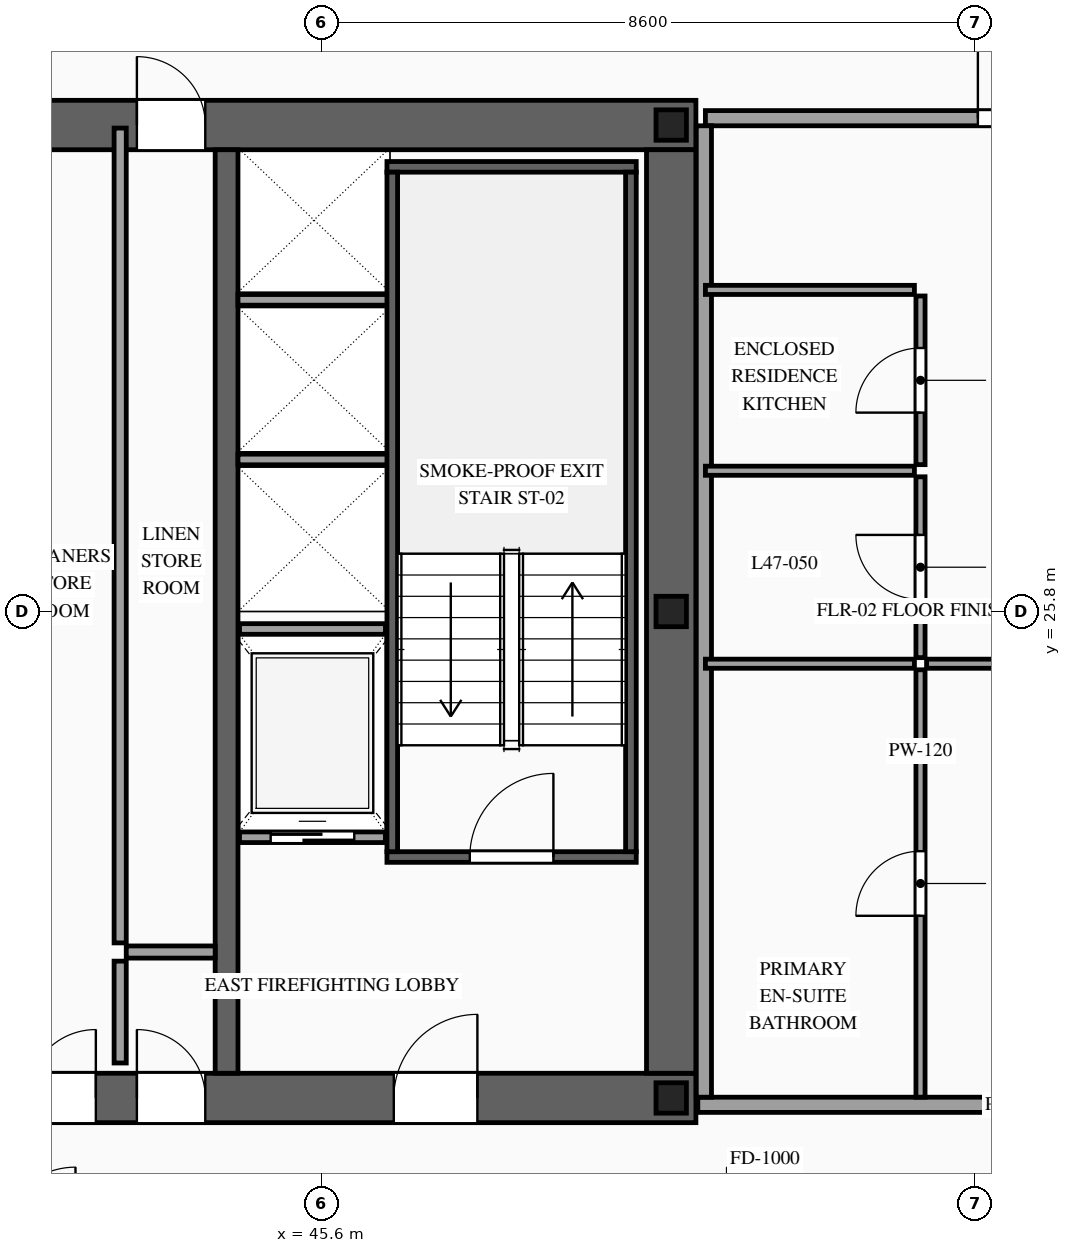
"""IFC4 building model, lengths in metres.
Left out: names, types, materials, properties, quantities, classifications, styles, units other than length and angle.
Written with IfcOpenShell. Run it as: python <this file> out.ifc"""

import sys

from ifc_helpers import new_model, si_unit, direction, frame, frame_2d, origin, origin_2d, place, context, subcontext, project, spatial, rectangle, i_section, extrude, source, transform, mapped, element, fill, save


model = new_model("IFC4")
c1 = context("Model", 3, precision=1e-05, world=origin(), true_north=direction((0.0, 1.0)))
c2 = subcontext(c1, "Body", "Model", "MODEL_VIEW")
j1 = project(units=[si_unit("LENGTHUNIT", "METRE"), si_unit("PLANEANGLEUNIT", "RADIAN")], contexts=[c1])
p1 = place(None, origin())
s1 = spatial("IfcSite", under=j1, at=p1, CompositionType="ELEMENT")
p2 = place(p1, origin())
s2 = spatial("IfcBuilding", under=s1, at=p2, CompositionType="ELEMENT")
p3 = place(p2, frame((0.0, 0.0, 181.0)))
s3 = spatial("IfcBuildingStorey", under=s2, at=p3, CompositionType="ELEMENT", Elevation=181.0)
p4 = place(p3, frame((23.475, 19.4, 0.0), z_axis=(0.0, 0.0, 1.0), x_axis=(1.0, 0.0, 0.0)))
e1 = element("IfcWall", 1, at=p4, inside=s3, PredefinedType="SHEAR", context=c2, shape_type="SweptSolid", body=[
    extrude(rectangle(XDim=27.05, YDim=0.65, at=frame_2d((13.525, 0.0))), origin(), (0.0, 0.0, 1.0), 3.5),
])
p5 = place(p4, frame((1.975, 0.0, 0.0)))
e2 = element("IfcOpeningElement", 2, at=p5, cuts=e1, PredefinedType="OPENING", context=c2, shape_type="SweptSolid", body=[
    extrude(rectangle(XDim=1.1, YDim=2.2, at=frame_2d((0.55, 1.1))), frame((0.0, 0.34, 0.0), z_axis=(0.0, -1.0, 0.0), x_axis=(1.0, 0.0, 0.0)), (0.0, 0.0, 1.0), 0.68),
])
p6 = place(p4, frame((9.875, 0.0, 0.0)))
e3 = element("IfcOpeningElement", 3, at=p6, cuts=e1, PredefinedType="OPENING", context=c2, shape_type="SweptSolid", body=[
    extrude(rectangle(XDim=1.1, YDim=2.2, at=frame_2d((0.55, 1.1))), frame((0.0, 0.34, 0.0), z_axis=(0.0, -1.0, 0.0), x_axis=(1.0, 0.0, 0.0)), (0.0, 0.0, 1.0), 0.68),
])
p7 = place(p4, frame((23.075, 0.0, 0.0)))
e4 = element("IfcOpeningElement", 4, at=p7, cuts=e1, PredefinedType="OPENING", context=c2, shape_type="SweptSolid", body=[
    extrude(rectangle(XDim=1.1, YDim=2.2, at=frame_2d((0.55, 1.1))), frame((0.0, 0.34, 0.0), z_axis=(0.0, -1.0, 0.0), x_axis=(1.0, 0.0, 0.0)), (0.0, 0.0, 1.0), 0.68),
])
p8 = place(p4, frame((19.695, 0.0, 0.0)))
e5 = element("IfcOpeningElement", 5, at=p8, cuts=e1, PredefinedType="OPENING", context=c2, shape_type="SweptSolid", body=[
    extrude(rectangle(XDim=0.9, YDim=2.15, at=frame_2d((0.45, 1.075))), frame((0.0, 0.34, 0.0), z_axis=(0.0, -1.0, 0.0), x_axis=(1.0, 0.0, 0.0)), (0.0, 0.0, 1.0), 0.68),
])
p9 = place(p4, frame((18.255, 0.0, 0.0)))
e6 = element("IfcOpeningElement", 6, at=p9, cuts=e1, PredefinedType="OPENING", context=c2, shape_type="SweptSolid", body=[
    extrude(rectangle(XDim=0.9, YDim=2.15, at=frame_2d((0.45, 1.075))), frame((0.0, 0.34, 0.0), z_axis=(0.0, -1.0, 0.0), x_axis=(1.0, 0.0, 0.0)), (0.0, 0.0, 1.0), 0.68),
])
p10 = place(p3, frame((23.475, 32.2, 0.0), z_axis=(0.0, 0.0, 1.0), x_axis=(1.0, 0.0, 0.0)))
e7 = element("IfcWall", 7, at=p10, inside=s3, PredefinedType="SHEAR", context=c2, shape_type="SweptSolid", body=[
    extrude(rectangle(XDim=27.05, YDim=0.65, at=frame_2d((13.525, 0.0))), origin(), (0.0, 0.0, 1.0), 3.5),
])
p11 = place(p10, frame((4.595, 0.0, 0.0)))
e8 = element("IfcOpeningElement", 8, at=p11, cuts=e7, PredefinedType="OPENING", context=c2, shape_type="SweptSolid", body=[
    extrude(rectangle(XDim=0.9, YDim=2.15, at=frame_2d((0.45, 1.075))), frame((0.0, 0.34, 0.0), z_axis=(0.0, -1.0, 0.0), x_axis=(1.0, 0.0, 0.0)), (0.0, 0.0, 1.0), 0.68),
])
p12 = place(p10, frame((9.875, 0.0, 0.0)))
e9 = element("IfcOpeningElement", 9, at=p12, cuts=e7, PredefinedType="OPENING", context=c2, shape_type="SweptSolid", body=[
    extrude(rectangle(XDim=1.1, YDim=2.2, at=frame_2d((0.55, 1.1))), frame((0.0, 0.34, 0.0), z_axis=(0.0, -1.0, 0.0), x_axis=(1.0, 0.0, 0.0)), (0.0, 0.0, 1.0), 0.68),
])
p13 = place(p10, frame((15.725, 0.0, 0.0)))
e10 = element("IfcOpeningElement", 10, at=p13, cuts=e7, PredefinedType="OPENING", context=c2, shape_type="SweptSolid", body=[
    extrude(rectangle(XDim=1.1, YDim=2.2, at=frame_2d((0.55, 1.1))), frame((0.0, 0.34, 0.0), z_axis=(0.0, -1.0, 0.0), x_axis=(1.0, 0.0, 0.0)), (0.0, 0.0, 1.0), 0.68),
])
p14 = place(p10, frame((19.695, 0.0, 0.0)))
e11 = element("IfcOpeningElement", 11, at=p14, cuts=e7, PredefinedType="OPENING", context=c2, shape_type="SweptSolid", body=[
    extrude(rectangle(XDim=0.9, YDim=2.15, at=frame_2d((0.45, 1.075))), frame((0.0, 0.34, 0.0), z_axis=(0.0, -1.0, 0.0), x_axis=(1.0, 0.0, 0.0)), (0.0, 0.0, 1.0), 0.68),
])
m1 = source(origin(), c2, "Body", "SweptSolid", [
    extrude(rectangle(XDim=12.15, YDim=0.65, at=frame_2d((6.075, 0.0))), origin(), (0.0, 0.0, 1.0), 3.5),
])
p15 = place(p3, frame((50.2, 19.725, 0.0), z_axis=(0.0, 0.0, 1.0), x_axis=(0.0, 1.0, 0.0)))
e12 = element("IfcWall", 12, at=p15, inside=s3, PredefinedType="SHEAR", context=c2, shape_type="MappedRepresentation", body=[
    mapped(m1, transform((0.0, 0.0, 0.0), scale=1.0)),
])
m2 = source(origin(), c2, "Body", "SweptSolid", [
    extrude(rectangle(XDim=12.15, YDim=0.3, at=frame_2d((6.075, 0.0))), origin(), (0.0, 0.0, 1.0), 3.5),
])
p16 = place(p3, frame((44.35, 19.725, 0.0), z_axis=(0.0, 0.0, 1.0), x_axis=(0.0, 1.0, 0.0)))
e13 = element("IfcWall", 13, at=p16, inside=s3, PredefinedType="SOLIDWALL", context=c2, shape_type="MappedRepresentation", body=[
    mapped(m2, transform((0.0, 0.0, 0.0), scale=1.0)),
])
m3 = source(origin(), c2, "Body", "SweptSolid", [
    extrude(i_section(OverallWidth=0.4, OverallDepth=0.4, WebThickness=0.013, FlangeThickness=0.021, at=origin_2d()), origin(), (0.0, 0.0, 1.0), 3.5),
])
for number, where, z_axis, x_axis in (
    (14, (50.2, 19.4, 0.0), (0.0, 0.0, 1.0), (1.0, 0.0, 0.0)),
    (15, (50.2, 25.8, 0.0), (0.0, 0.0, 1.0), (1.0, 0.0, 0.0)),
    (16, (50.2, 32.2, 0.0), (0.0, 0.0, 1.0), (1.0, 0.0, 0.0)),
):
    element("IfcColumn", number, at=place(p3, frame(where, z_axis=z_axis, x_axis=x_axis)), inside=s3, PredefinedType="COLUMN", context=c2, shape_type="MappedRepresentation", body=[
        mapped(m3, transform((0.0, 0.0, 0.0), scale=1.0)),
    ])
p17 = place(p3, frame((44.52, 22.83, 0.0), z_axis=(0.0, 0.0, 1.0), x_axis=(1.0, 0.0, 0.0)))
e17 = element("IfcWall", 17, at=p17, inside=s3, PredefinedType="SOLIDWALL", context=c2, shape_type="SweptSolid", body=[
    extrude(rectangle(XDim=1.92, YDim=0.14, at=frame_2d((0.96, 0.0))), origin(), (0.0, 0.0, 1.0), 3.28),
])
p18 = place(p17, frame((0.41, 0.0, 0.0)))
e18 = element("IfcOpeningElement", 18, at=p18, cuts=e17, PredefinedType="OPENING", context=c2, shape_type="SweptSolid", body=[
    extrude(rectangle(XDim=1.1, YDim=2.2, at=frame_2d((0.55, 1.1))), frame((0.0, 0.085, 0.0), z_axis=(0.0, -1.0, 0.0), x_axis=(1.0, 0.0, 0.0)), (0.0, 0.0, 1.0), 0.17),
])
m4 = source(origin(), c2, "Body", "SweptSolid", [
    extrude(rectangle(XDim=1.92, YDim=0.14, at=frame_2d((0.96, 0.0))), origin(), (0.0, 0.0, 1.0), 3.28),
])
p19 = place(p3, frame((44.52, 25.57, 0.0), z_axis=(0.0, 0.0, 1.0), x_axis=(1.0, 0.0, 0.0)))
e19 = element("IfcWall", 19, at=p19, inside=s3, PredefinedType="SOLIDWALL", context=c2, shape_type="MappedRepresentation", body=[
    mapped(m4, transform((0.0, 0.0, 0.0), scale=1.0)),
])
m5 = source(origin(), c2, "Body", "SweptSolid", [
    extrude(rectangle(XDim=2.0, YDim=0.14, at=frame_2d((1.0, 0.0))), origin(), (0.0, 0.0, 1.0), 3.28),
])
for number, where, z_axis, x_axis in (
    (20, (44.5, 27.8, 0.0), (0.0, 0.0, 1.0), (1.0, 0.0, 0.0)),
    (21, (44.5, 29.9, 0.0), (0.0, 0.0, 1.0), (1.0, 0.0, 0.0)),
):
    element("IfcWall", number, at=place(p3, frame(where, z_axis=z_axis, x_axis=x_axis)), inside=s3, PredefinedType="SOLIDWALL", context=c2, shape_type="MappedRepresentation", body=[
        mapped(m5, transform((0.0, 0.0, 0.0), scale=1.0)),
    ])
p20 = place(p3, frame((46.46, 22.57, 0.0), z_axis=(0.0, 0.0, 1.0), x_axis=(1.0, 0.0, 0.0)))
e22 = element("IfcWall", 22, at=p20, inside=s3, PredefinedType="SOLIDWALL", context=c2, shape_type="SweptSolid", body=[
    extrude(rectangle(XDim=3.28, YDim=0.14, at=frame_2d((1.64, 0.0))), origin(), (0.0, 0.0, 1.0), 3.28),
])
p21 = place(p20, frame((1.09, 0.0, 0.0)))
e23 = element("IfcOpeningElement", 23, at=p21, cuts=e22, PredefinedType="OPENING", context=c2, shape_type="SweptSolid", body=[
    extrude(rectangle(XDim=1.1, YDim=2.2, at=frame_2d((0.55, 1.1))), frame((0.0, 0.085, 0.0), z_axis=(0.0, -1.0, 0.0), x_axis=(1.0, 0.0, 0.0)), (0.0, 0.0, 1.0), 0.17),
])
m6 = source(origin(), c2, "Body", "SweptSolid", [
    extrude(rectangle(XDim=3.28, YDim=0.14, at=frame_2d((1.64, 0.0))), origin(), (0.0, 0.0, 1.0), 3.28),
])
p22 = place(p3, frame((46.46, 31.65, 0.0), z_axis=(0.0, 0.0, 1.0), x_axis=(1.0, 0.0, 0.0)))
e24 = element("IfcWall", 24, at=p22, inside=s3, PredefinedType="SOLIDWALL", context=c2, shape_type="MappedRepresentation", body=[
    mapped(m6, transform((0.0, 0.0, 0.0), scale=1.0)),
])
m7 = source(origin(), c2, "Body", "SweptSolid", [
    extrude(rectangle(XDim=8.94, YDim=0.14, at=frame_2d((4.47, 0.0))), origin(), (0.0, 0.0, 1.0), 3.28),
])
for number, where, z_axis, x_axis in (
    (25, (46.53, 22.64, 0.0), (0.0, 0.0, 1.0), (0.0, 1.0, 0.0)),
    (26, (49.67, 22.64, 0.0), (0.0, 0.0, 1.0), (0.0, 1.0, 0.0)),
):
    element("IfcWall", number, at=place(p3, frame(where, z_axis=z_axis, x_axis=x_axis)), inside=s3, PredefinedType="SOLIDWALL", context=c2, shape_type="MappedRepresentation", body=[
        mapped(m7, transform((0.0, 0.0, 0.0), scale=1.0)),
    ])
m8 = source(origin(), c2, "Body", "SweptSolid", [
    extrude(rectangle(XDim=1.34, YDim=0.16, at=frame_2d((0.67, 0.0))), origin(), (0.0, 0.0, 1.0), 3.28),
])
p23 = place(p3, frame((42.95, 19.86, 0.0), z_axis=(0.0, 0.0, 1.0), x_axis=(0.0, 1.0, 0.0)))
e27 = element("IfcWall", 27, at=p23, inside=s3, PredefinedType="PARTITIONING", context=c2, shape_type="MappedRepresentation", body=[
    mapped(m8, transform((0.0, 0.0, 0.0), scale=1.0)),
])
m9 = source(origin(), c2, "Body", "SweptSolid", [
    extrude(rectangle(XDim=1.17, YDim=0.16, at=frame_2d((0.585, 0.0))), origin(), (0.0, 0.0, 1.0), 3.28),
])
p24 = place(p3, frame((43.03, 21.32, 0.0), z_axis=(0.0, 0.0, 1.0), x_axis=(1.0, 0.0, 0.0)))
e28 = element("IfcWall", 28, at=p24, inside=s3, PredefinedType="PARTITIONING", context=c2, shape_type="MappedRepresentation", body=[
    mapped(m9, transform((0.0, 0.0, 0.0), scale=1.0)),
])
m10 = source(origin(), c2, "Body", "SweptSolid", [
    extrude(rectangle(XDim=10.72, YDim=0.16, at=frame_2d((5.36, 0.0))), origin(), (0.0, 0.0, 1.0), 3.28),
])
p25 = place(p3, frame((42.95, 21.44, 0.0), z_axis=(0.0, 0.0, 1.0), x_axis=(0.0, 1.0, 0.0)))
e29 = element("IfcWall", 29, at=p25, inside=s3, PredefinedType="PARTITIONING", context=c2, shape_type="MappedRepresentation", body=[
    mapped(m10, transform((0.0, 0.0, 0.0), scale=1.0)),
])
p26 = place(p3, frame((50.65, 32.29, 0.0), z_axis=(0.0, 0.0, 1.0), x_axis=(1.0, 0.0, 0.0)))
e30 = element("IfcWall", 30, at=p26, inside=s3, PredefinedType="PARTITIONING", context=c2, shape_type="SweptSolid", body=[
    extrude(rectangle(XDim=8.3, YDim=0.2, at=frame_2d((4.15, 0.0))), origin(), (0.0, 0.0, 1.0), 2.775),
])
p27 = place(p26, frame((3.585, 0.0, 0.0)))
e31 = element("IfcOpeningElement", 31, at=p27, cuts=e30, PredefinedType="OPENING", context=c2, shape_type="SweptSolid", body=[
    extrude(rectangle(XDim=1.0, YDim=2.2, at=frame_2d((0.5, 1.1))), frame((0.0, 0.115, 0.0), z_axis=(0.0, -1.0, 0.0), x_axis=(1.0, 0.0, 0.0)), (0.0, 0.0, 1.0), 0.23),
])
m11 = source(origin(), c2, "Body", "SweptSolid", [
    extrude(rectangle(XDim=8.4, YDim=0.2, at=frame_2d((4.2, 0.0))), origin(), (0.0, 0.0, 1.0), 2.775),
])
p28 = place(p3, frame((50.55, 19.31, 0.0), z_axis=(0.0, 0.0, 1.0), x_axis=(1.0, 0.0, 0.0)))
e32 = element("IfcWall", 32, at=p28, inside=s3, PredefinedType="PARTITIONING", context=c2, shape_type="MappedRepresentation", body=[
    mapped(m11, transform((0.0, 0.0, 0.0), scale=1.0)),
])
m12 = source(origin(), c2, "Body", "SweptSolid", [
    extrude(rectangle(XDim=12.78, YDim=0.2, at=frame_2d((6.39, 0.0))), origin(), (0.0, 0.0, 1.0), 3.28),
])
p29 = place(p3, frame((50.63, 19.41, 0.0), z_axis=(0.0, 0.0, 1.0), x_axis=(0.0, 1.0, 0.0)))
e33 = element("IfcWall", 33, at=p29, inside=s3, PredefinedType="PARTITIONING", context=c2, shape_type="MappedRepresentation", body=[
    mapped(m12, transform((0.0, 0.0, 0.0), scale=1.0)),
])
m13 = source(origin(), c2, "Body", "SweptSolid", [
    extrude(rectangle(XDim=2.75, YDim=0.12, at=frame_2d((1.375, 0.0))), origin(), (0.0, 0.0, 1.0), 3.28),
])
for number, where, z_axis, x_axis in (
    (34, (50.65, 25.113, 0.0), (0.0, 0.0, 1.0), (1.0, 0.0, 0.0)),
    (35, (50.65, 27.652, 0.0), (0.0, 0.0, 1.0), (1.0, 0.0, 0.0)),
):
    element("IfcWall", number, at=place(p3, frame(where, z_axis=z_axis, x_axis=x_axis)), inside=s3, PredefinedType="PARTITIONING", context=c2, shape_type="MappedRepresentation", body=[
        mapped(m13, transform((0.0, 0.0, 0.0), scale=1.0)),
    ])
p30 = place(p3, frame((53.48, 25.193, 0.0), z_axis=(0.0, 0.0, 1.0), x_axis=(0.0, 1.0, 0.0)))
e36 = element("IfcWall", 36, at=p30, inside=s3, PredefinedType="PARTITIONING", context=c2, shape_type="SweptSolid", body=[
    extrude(rectangle(XDim=2.379, YDim=0.12, at=frame_2d((1.189, 0.0))), origin(), (0.0, 0.0, 1.0), 3.28),
])
p31 = place(p30, frame((0.764, 0.0, 0.0)))
e37 = element("IfcOpeningElement", 37, at=p31, cuts=e36, PredefinedType="OPENING", context=c2, shape_type="SweptSolid", body=[
    extrude(rectangle(XDim=0.85, YDim=2.1, at=frame_2d((0.425, 1.05))), frame((0.0, 0.075, 0.0), z_axis=(0.0, -1.0, 0.0), x_axis=(1.0, 0.0, 0.0)), (0.0, 0.0, 1.0), 0.15),
])
p32 = place(p3, frame((50.65, 30.031, 0.0), z_axis=(0.0, 0.0, 1.0), x_axis=(1.0, 0.0, 0.0)))
e38 = element("IfcWall", 38, at=p32, inside=s3, PredefinedType="PARTITIONING", context=c2, shape_type="MappedRepresentation", body=[
    mapped(m13, transform((0.0, 0.0, 0.0), scale=1.0)),
])
p33 = place(p3, frame((53.48, 27.732, 0.0), z_axis=(0.0, 0.0, 1.0), x_axis=(0.0, 1.0, 0.0)))
e39 = element("IfcWall", 39, at=p33, inside=s3, PredefinedType="PARTITIONING", context=c2, shape_type="SweptSolid", body=[
    extrude(rectangle(XDim=2.219, YDim=0.12, at=frame_2d((1.109, 0.0))), origin(), (0.0, 0.0, 1.0), 3.28),
])
p34 = place(p33, frame((0.685, 0.0, 0.0)))
e40 = element("IfcOpeningElement", 40, at=p34, cuts=e39, PredefinedType="OPENING", context=c2, shape_type="SweptSolid", body=[
    extrude(rectangle(XDim=0.85, YDim=2.1, at=frame_2d((0.425, 1.05))), frame((0.0, 0.075, 0.0), z_axis=(0.0, -1.0, 0.0), x_axis=(1.0, 0.0, 0.0)), (0.0, 0.0, 1.0), 0.15),
])
p35 = place(p3, frame((53.56, 25.113, 0.0), z_axis=(0.0, 0.0, 1.0), x_axis=(1.0, 0.0, 0.0)))
e41 = element("IfcWall", 41, at=p35, inside=s3, PredefinedType="PARTITIONING", context=c2, shape_type="SweptSolid", body=[
    extrude(rectangle(XDim=5.39, YDim=0.12, at=frame_2d((2.695, 0.0))), origin(), (0.0, 0.0, 1.0), 3.28),
])
p36 = place(p35, frame((2.245, 0.0, 0.0)))
e42 = element("IfcOpeningElement", 42, at=p36, cuts=e41, PredefinedType="OPENING", context=c2, shape_type="SweptSolid", body=[
    extrude(rectangle(XDim=0.9, YDim=2.15, at=frame_2d((0.45, 1.075))), frame((0.0, 0.075, 0.0), z_axis=(0.0, -1.0, 0.0), x_axis=(1.0, 0.0, 0.0)), (0.0, 0.0, 1.0), 0.15),
])
p37 = place(p3, frame((53.48, 19.41, 0.0), z_axis=(0.0, 0.0, 1.0), x_axis=(0.0, 1.0, 0.0)))
e43 = element("IfcWall", 43, at=p37, inside=s3, PredefinedType="PARTITIONING", context=c2, shape_type="SweptSolid", body=[
    extrude(rectangle(XDim=5.623, YDim=0.12, at=frame_2d((2.812, 0.0))), origin(), (0.0, 0.0, 1.0), 3.28),
])
p38 = place(p37, frame((2.386, 0.0, 0.0)))
e44 = element("IfcOpeningElement", 44, at=p38, cuts=e43, PredefinedType="OPENING", context=c2, shape_type="SweptSolid", body=[
    extrude(rectangle(XDim=0.85, YDim=2.1, at=frame_2d((0.425, 1.05))), frame((0.0, 0.075, 0.0), z_axis=(0.0, -1.0, 0.0), x_axis=(1.0, 0.0, 0.0)), (0.0, 0.0, 1.0), 0.15),
])
m14 = source(origin(), c2, "Body", "SweptSolid", [
    extrude(rectangle(XDim=1.1, YDim=2.2, at=frame_2d((0.55, 1.1))), frame((0.0, 0.025, 0.0), z_axis=(0.0, -1.0, 0.0), x_axis=(1.0, 0.0, 0.0)), (0.0, 0.0, 1.0), 0.05),
])
p39 = place(p18, origin())
e45 = element("IfcDoor", 45, at=p39, inside=s3, OperationType="SLIDING_TO_RIGHT", PredefinedType="DOOR", context=c2, shape_type="MappedRepresentation", body=[
    mapped(m14, transform((0.0, 0.0, 0.0), scale=1.0)),
])
fill(e18, e45)
m15 = source(origin(), c2, "Body", "SweptSolid", [
    extrude(rectangle(XDim=1.1, YDim=2.2, at=frame_2d((0.55, 1.1))), frame((0.0, 0.025, 0.0), z_axis=(0.0, -1.0, 0.0), x_axis=(1.0, 0.0, 0.0)), (0.0, 0.0, 1.0), 0.05),
])
p40 = place(p21, origin())
e46 = element("IfcDoor", 46, at=p40, inside=s3, OperationType="SINGLE_SWING_RIGHT", PredefinedType="DOOR", context=c2, shape_type="MappedRepresentation", body=[
    mapped(m15, transform((0.0, 0.0, 0.0), scale=1.0)),
])
fill(e23, e46)
p41 = place(p7, origin())
e47 = element("IfcDoor", 47, at=p41, inside=s3, OperationType="SINGLE_SWING_RIGHT", PredefinedType="DOOR", context=c2, shape_type="MappedRepresentation", body=[
    mapped(m15, transform((0.0, 0.0, 0.0), scale=1.0)),
])
fill(e4, e47)
m16 = source(origin(), c2, "Body", "SweptSolid", [
    extrude(rectangle(XDim=0.9, YDim=2.15, at=frame_2d((0.45, 1.075))), frame((0.0, 0.025, 0.0), z_axis=(0.0, -1.0, 0.0), x_axis=(1.0, 0.0, 0.0)), (0.0, 0.0, 1.0), 0.05),
])
p42 = place(p8, origin())
e48 = element("IfcDoor", 48, at=p42, inside=s3, OperationType="SINGLE_SWING_LEFT", PredefinedType="DOOR", context=c2, shape_type="MappedRepresentation", body=[
    mapped(m16, transform((0.0, 0.0, 0.0), scale=1.0)),
])
fill(e5, e48)
p43 = place(p9, origin())
e49 = element("IfcDoor", 49, at=p43, inside=s3, OperationType="SINGLE_SWING_RIGHT", PredefinedType="DOOR", context=c2, shape_type="MappedRepresentation", body=[
    mapped(m16, transform((0.0, 0.0, 0.0), scale=1.0)),
])
fill(e6, e49)
p44 = place(p14, origin())
e50 = element("IfcDoor", 50, at=p44, inside=s3, OperationType="SINGLE_SWING_LEFT", PredefinedType="DOOR", context=c2, shape_type="MappedRepresentation", body=[
    mapped(m16, transform((0.0, 0.0, 0.0), scale=1.0)),
])
fill(e11, e50)
m17 = source(origin(), c2, "Body", "SweptSolid", [
    extrude(rectangle(XDim=1.0, YDim=2.2, at=frame_2d((0.5, 1.1))), frame((0.0, 0.025, 0.0), z_axis=(0.0, -1.0, 0.0), x_axis=(1.0, 0.0, 0.0)), (0.0, 0.0, 1.0), 0.05),
])
p45 = place(p27, origin())
e51 = element("IfcDoor", 51, at=p45, inside=s3, OperationType="SINGLE_SWING_LEFT", PredefinedType="DOOR", context=c2, shape_type="MappedRepresentation", body=[
    mapped(m17, transform((0.0, 0.0, 0.0), scale=1.0)),
])
fill(e31, e51)
m18 = source(origin(), c2, "Body", "SweptSolid", [
    extrude(rectangle(XDim=0.85, YDim=2.1, at=frame_2d((0.425, 1.05))), frame((0.0, 0.025, 0.0), z_axis=(0.0, -1.0, 0.0), x_axis=(1.0, 0.0, 0.0)), (0.0, 0.0, 1.0), 0.05),
])
p46 = place(p31, origin())
e52 = element("IfcDoor", 52, at=p46, inside=s3, OperationType="SINGLE_SWING_RIGHT", PredefinedType="DOOR", context=c2, shape_type="MappedRepresentation", body=[
    mapped(m18, transform((0.0, 0.0, 0.0), scale=1.0)),
])
fill(e37, e52)
p47 = place(p34, origin())
e53 = element("IfcDoor", 53, at=p47, inside=s3, OperationType="SINGLE_SWING_LEFT", PredefinedType="DOOR", context=c2, shape_type="MappedRepresentation", body=[
    mapped(m18, transform((0.0, 0.0, 0.0), scale=1.0)),
])
fill(e40, e53)
p48 = place(p38, origin())
e54 = element("IfcDoor", 54, at=p48, inside=s3, OperationType="SINGLE_SWING_LEFT", PredefinedType="DOOR", context=c2, shape_type="MappedRepresentation", body=[
    mapped(m18, transform((0.0, 0.0, 0.0), scale=1.0)),
])
fill(e44, e54)
save(model, sys.argv[1])
